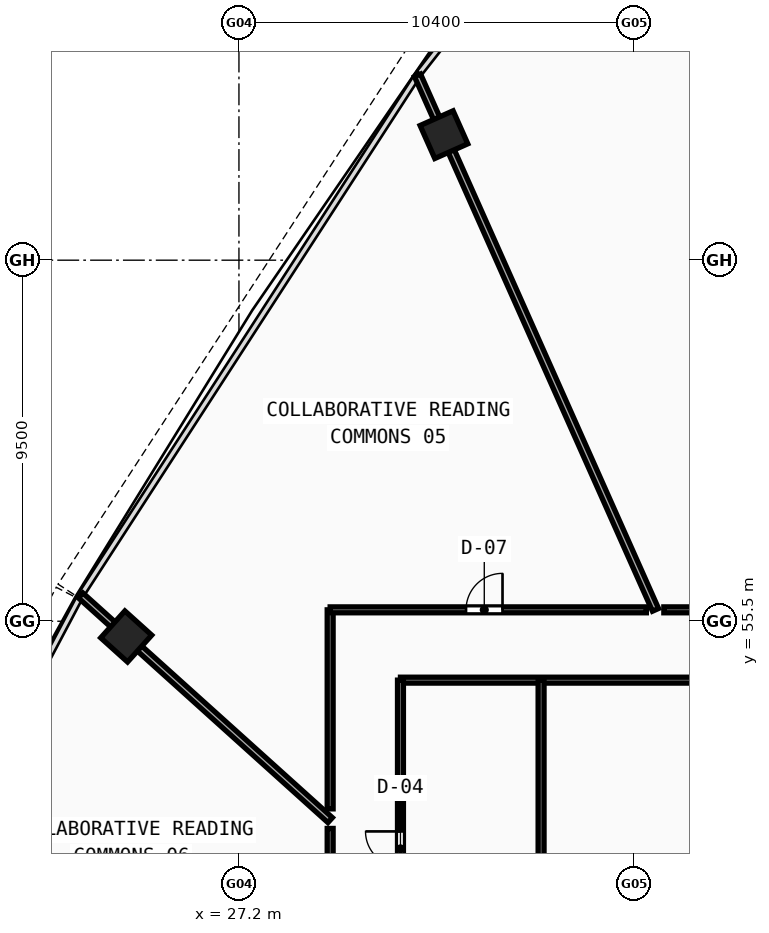
"""IFC4 building model, lengths in metres.
Left out: names, types, materials, properties, quantities, classifications, styles, units other than length and angle.
Written with IfcOpenShell. Run it as: python <this file> out.ifc"""

import sys

from ifc_helpers import new_model, si_unit, direction, frame, frame_2d, origin, origin_with_axes, origin_2d, place, context, subcontext, project, spatial, rectangle, hollow_rectangle, extrude, source, transform, mapped, element, fill, save


model = new_model("IFC4")
c1 = context("Model", 3, precision=1e-05, world=origin(), true_north=direction((0.0, 1.0)))
c2 = subcontext(c1, "Body", "Model", "MODEL_VIEW")
j1 = project(units=[si_unit("LENGTHUNIT", "METRE"), si_unit("PLANEANGLEUNIT", "RADIAN")], contexts=[c1])
p1 = place(None, origin())
s1 = spatial("IfcSite", under=j1, at=p1, CompositionType="ELEMENT")
p2 = place(p1, origin())
s2 = spatial("IfcBuilding", under=s1, at=p2, CompositionType="ELEMENT")
p3 = place(p2, frame((0.0, 0.0, 140.87)))
s3 = spatial("IfcBuildingStorey", under=s2, at=p3, CompositionType="ELEMENT", Elevation=140.87)
m1 = source(origin(), c2, "Body", "SweptSolid", [
    extrude(hollow_rectangle(XDim=0.95, YDim=0.95, WallThickness=0.04, at=origin_2d()), origin(), (0.0, 0.0, 1.0), 3.68),
])
for number, where, z_axis, x_axis in (
    (1, (32.594, 68.303, -0.26), (0.0, 0.0, 1.0), (-0.914, -0.407, 0.0)),
    (2, (24.234, 55.099, -0.26), (0.0, 0.0, 1.0), (-0.669, -0.743, 0.0)),
):
    element("IfcColumn", number, at=place(p3, frame(where, z_axis=z_axis, x_axis=x_axis)), inside=s3, PredefinedType="COLUMN", context=c2, shape_type="MappedRepresentation", body=[
        mapped(m1, transform((0.0, 0.0, 0.0), scale=1.0)),
    ])
p4 = place(p3, frame((31.45, 53.95, 0.0), z_axis=(0.0, 0.0, 1.0), x_axis=(1.0, 0.0, 0.0)))
e3 = element("IfcWall", 3, at=p4, inside=s3, PredefinedType="PARTITIONING", context=c2, shape_type="SweptSolid", body=[
    extrude(rectangle(XDim=33.1, YDim=0.155, at=frame_2d((16.55, 0.0))), origin(), (0.0, 0.0, 1.0), 2.77),
])
p5 = place(p4, frame((8.0, 0.0, 0.0)))
e4 = element("IfcOpeningElement", 4, at=p5, cuts=e3, PredefinedType="OPENING", context=c2, shape_type="SweptSolid", body=[
    extrude(rectangle(XDim=0.92, YDim=2.1, at=frame_2d((0.46, 1.05))), frame((0.0, 0.087, 0.0), z_axis=(0.0, -1.0, 0.0), x_axis=(1.0, 0.0, 0.0)), (0.0, 0.0, 1.0), 0.175),
])
p6 = place(p4, frame((25.05, 0.0, 0.0)))
e5 = element("IfcOpeningElement", 5, at=p6, cuts=e3, PredefinedType="OPENING", context=c2, shape_type="SweptSolid", body=[
    extrude(rectangle(XDim=0.92, YDim=2.1, at=frame_2d((0.46, 1.05))), frame((0.0, 0.087, 0.0), z_axis=(0.0, -1.0, 0.0), x_axis=(1.0, 0.0, 0.0)), (0.0, 0.0, 1.0), 0.175),
])
p7 = place(p3, frame((31.45, 42.25, 0.0), z_axis=(0.0, 0.0, 1.0), x_axis=(0.0, 1.0, 0.0)))
e6 = element("IfcWall", 6, at=p7, inside=s3, PredefinedType="PARTITIONING", context=c2, shape_type="SweptSolid", body=[
    extrude(rectangle(XDim=11.7, YDim=0.155, at=frame_2d((5.85, 0.0))), origin(), (0.0, 0.0, 1.0), 2.77),
])
p8 = place(p7, frame((1.4, 0.0, 0.0)))
e7 = element("IfcOpeningElement", 7, at=p8, cuts=e6, PredefinedType="OPENING", context=c2, shape_type="SweptSolid", body=[
    extrude(rectangle(XDim=0.94, YDim=2.1, at=frame_2d((0.47, 1.05))), frame((0.0, 0.087, 0.0), z_axis=(0.0, -1.0, 0.0), x_axis=(1.0, 0.0, 0.0)), (0.0, 0.0, 1.0), 0.175),
])
p9 = place(p7, frame((6.8, 0.0, 0.0)))
e8 = element("IfcOpeningElement", 8, at=p9, cuts=e6, PredefinedType="OPENING", context=c2, shape_type="SweptSolid", body=[
    extrude(rectangle(XDim=0.92, YDim=2.1, at=frame_2d((0.46, 1.05))), frame((0.0, 0.087, 0.0), z_axis=(0.0, -1.0, 0.0), x_axis=(1.0, 0.0, 0.0)), (0.0, 0.0, 1.0), 0.175),
])
p10 = place(p3, frame((35.15, 42.25, 0.0), z_axis=(0.0, 0.0, 1.0), x_axis=(0.0, 1.0, 0.0)))
e9 = element("IfcWall", 9, at=p10, inside=s3, PredefinedType="PARTITIONING", context=c2, shape_type="SweptSolid", body=[
    extrude(rectangle(XDim=11.7, YDim=0.155, at=frame_2d((5.85, 0.0))), origin(), (0.0, 0.0, 1.0), 2.77),
])
p11 = place(p3, frame((38.16, 55.8, 0.0), z_axis=(0.0, 0.0, 1.0), x_axis=(-0.406735812773, 0.913545827317, 0.0)))
e10 = element("IfcWall", 10, at=p11, inside=s3, PredefinedType="PARTITIONING", context=c2, shape_type="SweptSolid", body=[
    extrude(rectangle(XDim=15.394, YDim=0.175, at=frame_2d((7.697, 0.0))), origin(), (0.0, 0.0, 1.0), 2.77),
])
p12 = place(p3, frame((29.6, 50.267, 0.0), z_axis=(0.0, 0.0, 1.0), x_axis=(-0.743144335498, 0.669131150535, 0.0)))
e11 = element("IfcWall", 11, at=p12, inside=s3, PredefinedType="PARTITIONING", context=c2, shape_type="SweptSolid", body=[
    extrude(rectangle(XDim=8.834, YDim=0.175, at=frame_2d((4.417, 0.0))), origin(), (0.0, 0.0, 1.0), 2.77),
])
p13 = place(p3, frame((29.6, 42.919, 0.0), z_axis=(0.0, 0.0, 1.0), x_axis=(0.0, 1.0, 0.0)))
e12 = element("IfcWall", 12, at=p13, inside=s3, PredefinedType="PARTITIONING", context=c2, shape_type="SweptSolid", body=[
    extrude(rectangle(XDim=7.128, YDim=0.155, at=frame_2d((3.564, 0.0))), origin(), (0.0, 0.0, 1.0), 2.77),
])
p14 = place(p13, frame((3.077, 0.0, 0.0)))
e13 = element("IfcOpeningElement", 13, at=p14, cuts=e12, PredefinedType="OPENING", context=c2, shape_type="SweptSolid", body=[
    extrude(rectangle(XDim=0.96, YDim=2.12, at=frame_2d((0.48, 1.06))), frame((0.0, 0.087, 0.0), z_axis=(0.0, -1.0, 0.0), x_axis=(1.0, 0.0, 0.0)), (0.0, 0.0, 1.0), 0.175),
])
p15 = place(p3, frame((29.6, 50.563, 0.0), z_axis=(0.0, 0.0, 1.0), x_axis=(0.0, 1.0, 0.0)))
e14 = element("IfcWall", 14, at=p15, inside=s3, PredefinedType="PARTITIONING", context=c2, shape_type="SweptSolid", body=[
    extrude(rectangle(XDim=5.237, YDim=0.155, at=frame_2d((2.618, 0.0))), origin(), (0.0, 0.0, 1.0), 3.02),
])
p16 = place(p3, frame((29.6, 55.8, 0.0), z_axis=(0.0, 0.0, 1.0), x_axis=(1.0, 0.0, 0.0)))
e15 = element("IfcWall", 15, at=p16, inside=s3, PredefinedType="PARTITIONING", context=c2, shape_type="SweptSolid", body=[
    extrude(rectangle(XDim=8.32, YDim=0.155, at=frame_2d((4.16, 0.0))), origin(), (0.0, 0.0, 1.0), 3.02),
])
p17 = place(p16, frame((3.575, 0.0, 0.0)))
e16 = element("IfcOpeningElement", 16, at=p17, cuts=e15, PredefinedType="OPENING", context=c2, shape_type="SweptSolid", body=[
    extrude(rectangle(XDim=0.96, YDim=2.12, at=frame_2d((0.48, 1.06))), frame((0.0, 0.087, 0.0), z_axis=(0.0, -1.0, 0.0), x_axis=(1.0, 0.0, 0.0)), (0.0, 0.0, 1.0), 0.175),
])
p18 = place(p3, frame((38.38, 55.8, 0.0), z_axis=(0.0, 0.0, 1.0), x_axis=(1.0, 0.0, 0.0)))
e17 = element("IfcWall", 17, at=p18, inside=s3, PredefinedType="PARTITIONING", context=c2, shape_type="SweptSolid", body=[
    extrude(rectangle(XDim=5.329, YDim=0.155, at=frame_2d((2.665, 0.0))), origin(), (0.0, 0.0, 1.0), 2.77),
])
p19 = place(p18, frame((2.115, 0.0, 0.0)))
e18 = element("IfcOpeningElement", 18, at=p19, cuts=e17, PredefinedType="OPENING", context=c2, shape_type="SweptSolid", body=[
    extrude(rectangle(XDim=0.96, YDim=2.12, at=frame_2d((0.48, 1.06))), frame((0.0, 0.087, 0.0), z_axis=(0.0, -1.0, 0.0), x_axis=(1.0, 0.0, 0.0)), (0.0, 0.0, 1.0), 0.175),
])
m2 = source(origin(), c2, "Body", "SweptSolid", [
    extrude(rectangle(XDim=0.92, YDim=2.1, at=frame_2d((0.46, 1.05))), frame((0.0, 0.025, 0.0), z_axis=(0.0, -1.0, 0.0), x_axis=(1.0, 0.0, 0.0)), (0.0, 0.0, 1.0), 0.05),
])
p20 = place(p9, origin_with_axes())
e19 = element("IfcDoor", 19, at=p20, inside=s3, OperationType="SINGLE_SWING_RIGHT", PredefinedType="DOOR", context=c2, shape_type="MappedRepresentation", body=[
    mapped(m2, transform((0.0, 0.0, 0.0), scale=1.0)),
])
fill(e8, e19)
m3 = source(origin(), c2, "Body", "SweptSolid", [
    extrude(rectangle(XDim=0.96, YDim=2.12, at=frame_2d((0.48, 1.06))), frame((0.0, 0.025, 0.0), z_axis=(0.0, -1.0, 0.0), x_axis=(1.0, 0.0, 0.0)), (0.0, 0.0, 1.0), 0.05),
])
p21 = place(p17, origin_with_axes())
e20 = element("IfcDoor", 20, at=p21, inside=s3, OperationType="SINGLE_SWING_RIGHT", PredefinedType="DOOR", context=c2, shape_type="MappedRepresentation", body=[
    mapped(m3, transform((0.0, 0.0, 0.0), scale=1.0)),
])
fill(e16, e20)
save(model, sys.argv[1])
